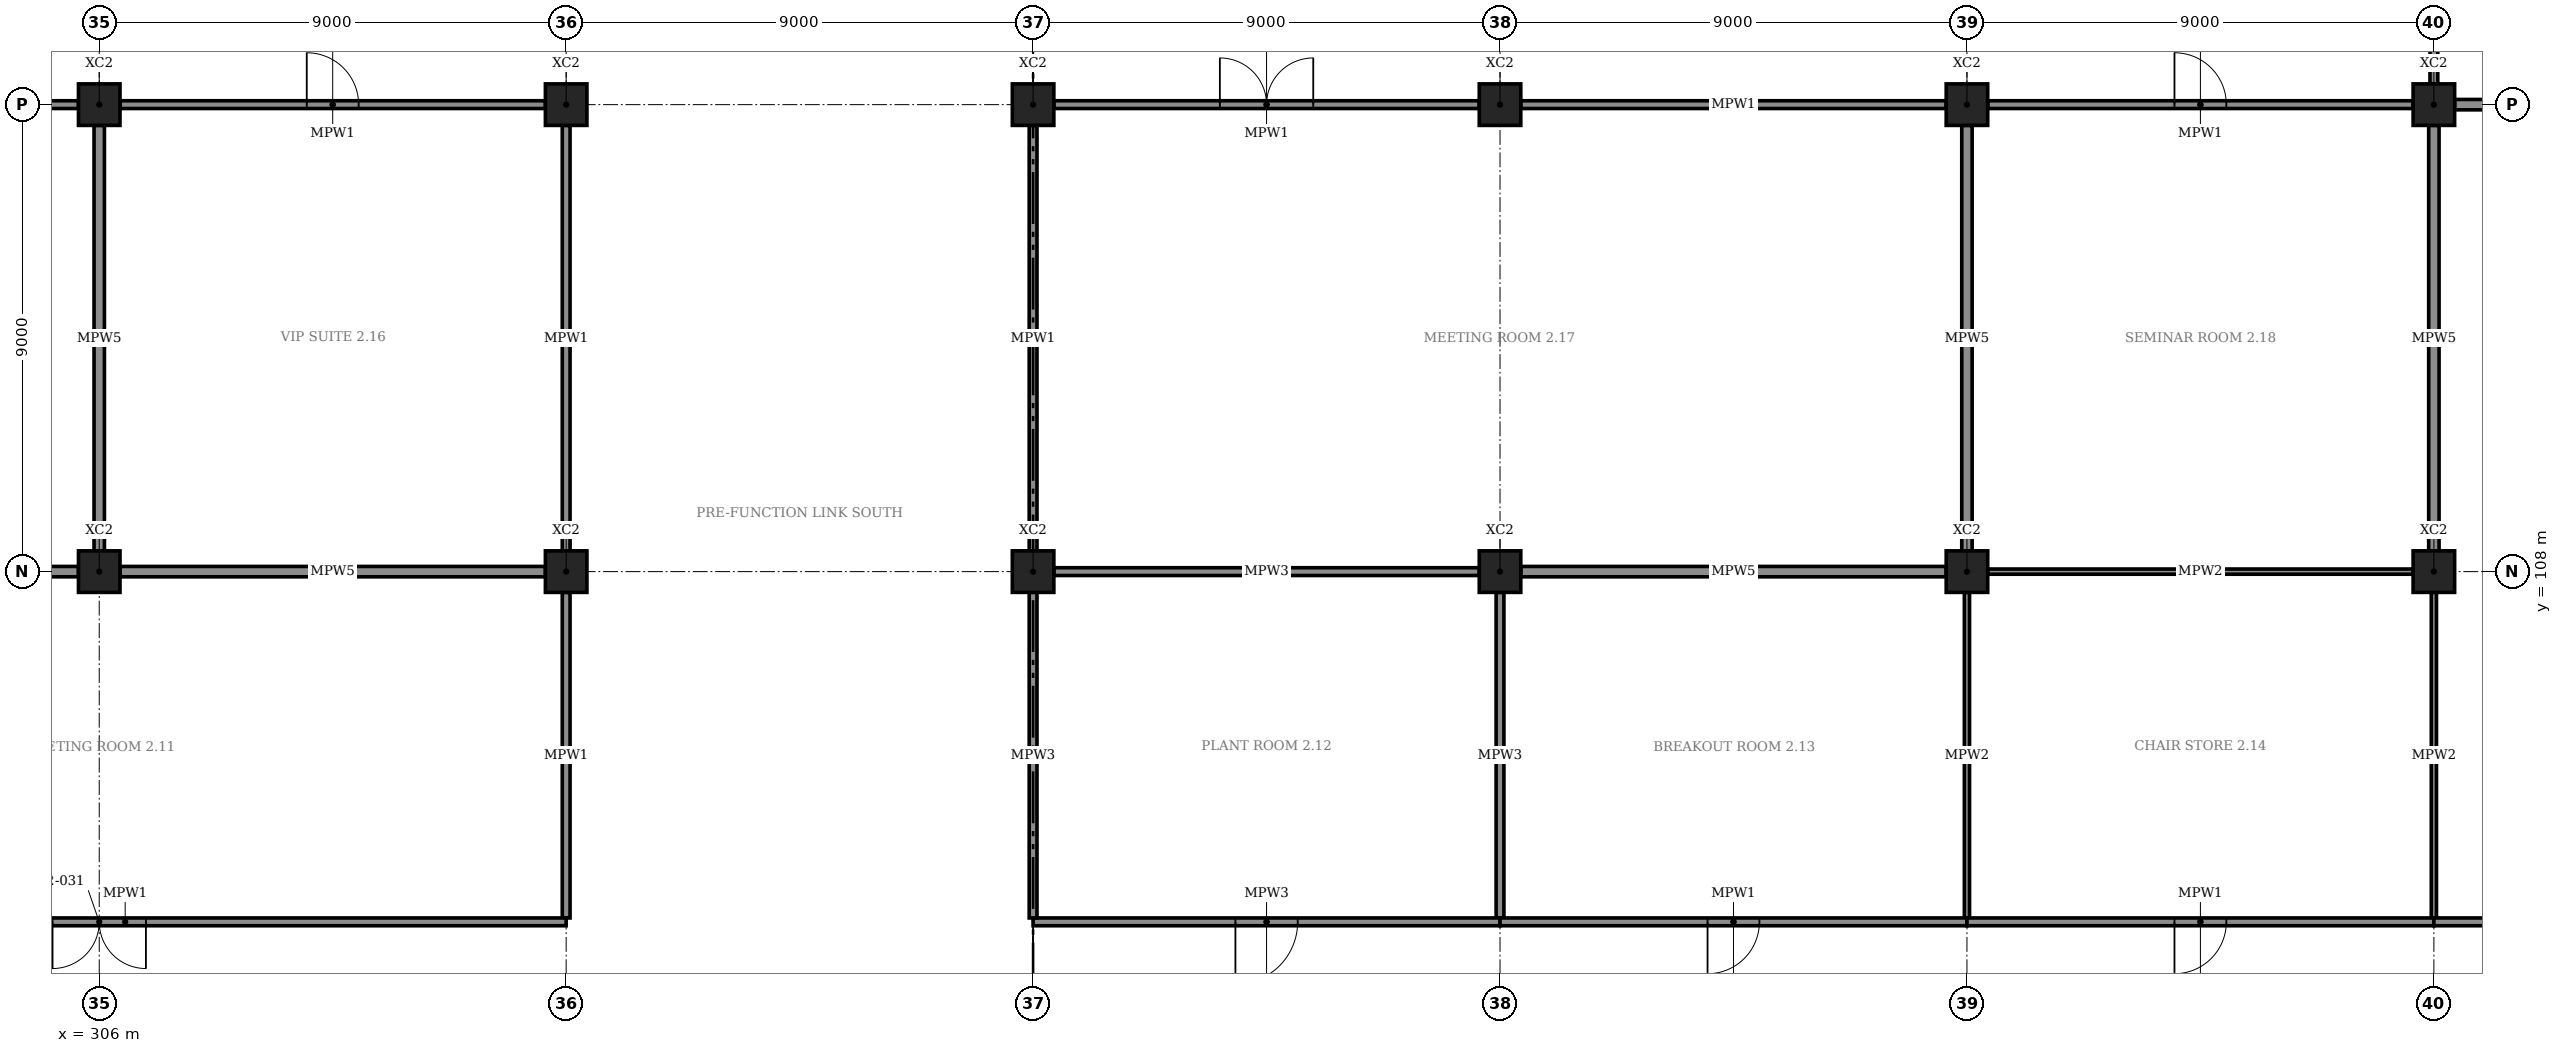
"""IFC4 building model, lengths in metres.
Left out: names, types, materials, properties, quantities, classifications, styles, units other than length and angle.
Written with IfcOpenShell. Run it as: python <this file> out.ifc"""

import sys

from ifc_helpers import new_model, si_unit, direction, frame, frame_2d, origin, origin_2d, place, context, subcontext, project, spatial, rectangle, extrude, element, fill, save


model = new_model("IFC4")
c1 = context("Model", 3, precision=1e-05, world=origin(), true_north=direction((0.0, 1.0)))
c2 = subcontext(c1, "Body", "Model", "MODEL_VIEW")
j1 = project(units=[si_unit("LENGTHUNIT", "METRE"), si_unit("PLANEANGLEUNIT", "RADIAN")], contexts=[c1])
p1 = place(None, origin())
s1 = spatial("IfcSite", under=j1, at=p1, CompositionType="ELEMENT")
p2 = place(p1, origin())
s2 = spatial("IfcBuilding", under=s1, at=p2, CompositionType="ELEMENT")
p3 = place(p2, frame((0.0, 0.0, 11.5)))
s3 = spatial("IfcBuildingStorey", under=s2, at=p3, CompositionType="ELEMENT", Elevation=11.5)
for number, where, z_axis, x_axis in (
    (1, (306.0, 108.0, 0.0), (0.0, 0.0, 1.0), (1.0, 0.0, 0.0)),
    (2, (306.0, 117.0, 0.0), (0.0, 0.0, 1.0), (1.0, 0.0, 0.0)),
    (3, (315.0, 108.0, 0.0), (0.0, 0.0, 1.0), (1.0, 0.0, 0.0)),
    (4, (315.0, 117.0, 0.0), (0.0, 0.0, 1.0), (1.0, 0.0, 0.0)),
    (5, (324.0, 108.0, 0.0), (0.0, 0.0, 1.0), (1.0, 0.0, 0.0)),
    (6, (324.0, 117.0, 0.0), (0.0, 0.0, 1.0), (1.0, 0.0, 0.0)),
    (7, (333.0, 108.0, 0.0), (0.0, 0.0, 1.0), (1.0, 0.0, 0.0)),
    (8, (333.0, 117.0, 0.0), (0.0, 0.0, 1.0), (1.0, 0.0, 0.0)),
    (9, (342.0, 108.0, 0.0), (0.0, 0.0, 1.0), (1.0, 0.0, 0.0)),
    (10, (342.0, 117.0, 0.0), (0.0, 0.0, 1.0), (1.0, 0.0, 0.0)),
    (11, (351.0, 108.0, 0.0), (0.0, 0.0, 1.0), (1.0, 0.0, 0.0)),
    (12, (351.0, 117.0, 0.0), (0.0, 0.0, 1.0), (1.0, 0.0, 0.0)),
):
    element("IfcColumn", number, at=place(p3, frame(where, z_axis=z_axis, x_axis=x_axis)), inside=s3, PredefinedType="COLUMN", context=c2, shape_type="SweptSolid", body=[
        extrude(rectangle(XDim=0.8, YDim=0.8, at=origin_2d()), origin(), (0.0, 0.0, 1.0), 5.5),
    ])
p4 = place(p3, frame((297.0, 101.25, 0.0), z_axis=(0.0, 0.0, 1.0), x_axis=(1.0, 0.0, 0.0)))
e13 = element("IfcWall", 13, at=p4, inside=s3, PredefinedType="PARTITIONING", context=c2, shape_type="SweptSolid", body=[
    extrude(rectangle(XDim=18.0, YDim=0.15, at=frame_2d((9.0, 0.0))), origin(), (0.0, 0.0, 1.0), 4.32),
])
p5 = place(p4, frame((8.1, 0.0, 0.0)))
e14 = element("IfcOpeningElement", 14, at=p5, cuts=e13, PredefinedType="OPENING", context=c2, shape_type="SweptSolid", body=[
    extrude(rectangle(XDim=1.8, YDim=2.4, at=frame_2d((0.9, 1.2))), frame((0.0, 0.085, 0.0), z_axis=(0.0, -1.0, 0.0), x_axis=(1.0, 0.0, 0.0)), (0.0, 0.0, 1.0), 0.17),
])
for number, where, z_axis, x_axis in (
    (15, (297.4, 108.0, 0.0), (0.0, 0.0, 1.0), (1.0, 0.0, 0.0)),
    (16, (306.4, 108.0, 0.0), (0.0, 0.0, 1.0), (1.0, 0.0, 0.0)),
):
    element("IfcWall", number, at=place(p3, frame(where, z_axis=z_axis, x_axis=x_axis)), inside=s3, PredefinedType="PARTITIONING", context=c2, shape_type="SweptSolid", body=[
        extrude(rectangle(XDim=8.2, YDim=0.2, at=frame_2d((4.1, 0.0))), origin(), (0.0, 0.0, 1.0), 4.32),
    ])
p6 = place(p3, frame((315.0, 101.325, 0.0), z_axis=(0.0, 0.0, 1.0), x_axis=(0.0, 1.0, 0.0)))
e17 = element("IfcWall", 17, at=p6, inside=s3, PredefinedType="PARTITIONING", context=c2, shape_type="SweptSolid", body=[
    extrude(rectangle(XDim=6.275, YDim=0.15, at=frame_2d((3.138, 0.0))), origin(), (0.0, 0.0, 1.0), 4.32),
])
p7 = place(p3, frame((324.0, 101.25, 0.0), z_axis=(0.0, 0.0, 1.0), x_axis=(1.0, 0.0, 0.0)))
e18 = element("IfcWall", 18, at=p7, inside=s3, PredefinedType="PARTITIONING", context=c2, shape_type="SweptSolid", body=[
    extrude(rectangle(XDim=9.0, YDim=0.15, at=frame_2d((4.5, 0.0))), origin(), (0.0, 0.0, 1.0), 4.32),
])
p8 = place(p7, frame((3.9, 0.0, 0.0)))
e19 = element("IfcOpeningElement", 19, at=p8, cuts=e18, PredefinedType="OPENING", context=c2, shape_type="SweptSolid", body=[
    extrude(rectangle(XDim=1.2, YDim=2.4, at=frame_2d((0.6, 1.2))), frame((0.0, 0.085, 0.0), z_axis=(0.0, -1.0, 0.0), x_axis=(1.0, 0.0, 0.0)), (0.0, 0.0, 1.0), 0.17),
])
p9 = place(p3, frame((324.4, 108.0, 0.0), z_axis=(0.0, 0.0, 1.0), x_axis=(1.0, 0.0, 0.0)))
e20 = element("IfcWall", 20, at=p9, inside=s3, PredefinedType="PARTITIONING", context=c2, shape_type="SweptSolid", body=[
    extrude(rectangle(XDim=8.2, YDim=0.15, at=frame_2d((4.1, 0.0))), origin(), (0.0, 0.0, 1.0), 4.32),
])
for number, where, z_axis, x_axis in (
    (21, (324.0, 101.325, 0.0), (0.0, 0.0, 1.0), (0.0, 1.0, 0.0)),
    (22, (333.0, 101.325, 0.0), (0.0, 0.0, 1.0), (0.0, 1.0, 0.0)),
):
    element("IfcWall", number, at=place(p3, frame(where, z_axis=z_axis, x_axis=x_axis)), inside=s3, PredefinedType="PARTITIONING", context=c2, shape_type="SweptSolid", body=[
        extrude(rectangle(XDim=6.275, YDim=0.15, at=frame_2d((3.138, 0.0))), origin(), (0.0, 0.0, 1.0), 4.32),
    ])
p10 = place(p3, frame((333.0, 101.25, 0.0), z_axis=(0.0, 0.0, 1.0), x_axis=(1.0, 0.0, 0.0)))
e23 = element("IfcWall", 23, at=p10, inside=s3, PredefinedType="PARTITIONING", context=c2, shape_type="SweptSolid", body=[
    extrude(rectangle(XDim=9.0, YDim=0.15, at=frame_2d((4.5, 0.0))), origin(), (0.0, 0.0, 1.0), 4.32),
])
p11 = place(p10, frame((4.0, 0.0, 0.0)))
e24 = element("IfcOpeningElement", 24, at=p11, cuts=e23, PredefinedType="OPENING", context=c2, shape_type="SweptSolid", body=[
    extrude(rectangle(XDim=1.0, YDim=2.4, at=frame_2d((0.5, 1.2))), frame((0.0, 0.085, 0.0), z_axis=(0.0, -1.0, 0.0), x_axis=(1.0, 0.0, 0.0)), (0.0, 0.0, 1.0), 0.17),
])
p12 = place(p3, frame((333.4, 108.0, 0.0), z_axis=(0.0, 0.0, 1.0), x_axis=(1.0, 0.0, 0.0)))
e25 = element("IfcWall", 25, at=p12, inside=s3, PredefinedType="PARTITIONING", context=c2, shape_type="SweptSolid", body=[
    extrude(rectangle(XDim=8.2, YDim=0.2, at=frame_2d((4.1, 0.0))), origin(), (0.0, 0.0, 1.0), 4.32),
])
p13 = place(p3, frame((342.0, 101.325, 0.0), z_axis=(0.0, 0.0, 1.0), x_axis=(0.0, 1.0, 0.0)))
e26 = element("IfcWall", 26, at=p13, inside=s3, PredefinedType="PARTITIONING", context=c2, shape_type="SweptSolid", body=[
    extrude(rectangle(XDim=6.275, YDim=0.1, at=frame_2d((3.138, 0.0))), origin(), (0.0, 0.0, 1.0), 4.32),
])
p14 = place(p3, frame((342.0, 101.25, 0.0), z_axis=(0.0, 0.0, 1.0), x_axis=(1.0, 0.0, 0.0)))
e27 = element("IfcWall", 27, at=p14, inside=s3, PredefinedType="PARTITIONING", context=c2, shape_type="SweptSolid", body=[
    extrude(rectangle(XDim=9.0, YDim=0.15, at=frame_2d((4.5, 0.0))), origin(), (0.0, 0.0, 1.0), 4.32),
])
p15 = place(p14, frame((4.0, 0.0, 0.0)))
e28 = element("IfcOpeningElement", 28, at=p15, cuts=e27, PredefinedType="OPENING", context=c2, shape_type="SweptSolid", body=[
    extrude(rectangle(XDim=1.0, YDim=2.4, at=frame_2d((0.5, 1.2))), frame((0.0, 0.085, 0.0), z_axis=(0.0, -1.0, 0.0), x_axis=(1.0, 0.0, 0.0)), (0.0, 0.0, 1.0), 0.17),
])
p16 = place(p3, frame((342.4, 108.0, 0.0), z_axis=(0.0, 0.0, 1.0), x_axis=(1.0, 0.0, 0.0)))
e29 = element("IfcWall", 29, at=p16, inside=s3, PredefinedType="PARTITIONING", context=c2, shape_type="SweptSolid", body=[
    extrude(rectangle(XDim=8.2, YDim=0.1, at=frame_2d((4.1, 0.0))), origin(), (0.0, 0.0, 1.0), 4.32),
])
p17 = place(p3, frame((351.0, 101.325, 0.0), z_axis=(0.0, 0.0, 1.0), x_axis=(0.0, 1.0, 0.0)))
e30 = element("IfcWall", 30, at=p17, inside=s3, PredefinedType="PARTITIONING", context=c2, shape_type="SweptSolid", body=[
    extrude(rectangle(XDim=6.275, YDim=0.1, at=frame_2d((3.138, 0.0))), origin(), (0.0, 0.0, 1.0), 4.32),
])
p18 = place(p3, frame((297.4, 117.0, 0.0), z_axis=(0.0, 0.0, 1.0), x_axis=(1.0, 0.0, 0.0)))
e31 = element("IfcWall", 31, at=p18, inside=s3, PredefinedType="PARTITIONING", context=c2, shape_type="SweptSolid", body=[
    extrude(rectangle(XDim=8.2, YDim=0.15, at=frame_2d((4.1, 0.0))), origin(), (0.0, 0.0, 1.0), 4.32),
])
p19 = place(p18, frame((3.6, 0.0, 0.0)))
e32 = element("IfcOpeningElement", 32, at=p19, cuts=e31, PredefinedType="OPENING", context=c2, shape_type="SweptSolid", body=[
    extrude(rectangle(XDim=1.0, YDim=2.4, at=frame_2d((0.5, 1.2))), frame((0.0, 0.085, 0.0), z_axis=(0.0, -1.0, 0.0), x_axis=(1.0, 0.0, 0.0)), (0.0, 0.0, 1.0), 0.17),
])
p20 = place(p3, frame((306.0, 108.4, 0.0), z_axis=(0.0, 0.0, 1.0), x_axis=(0.0, 1.0, 0.0)))
e33 = element("IfcWall", 33, at=p20, inside=s3, PredefinedType="PARTITIONING", context=c2, shape_type="SweptSolid", body=[
    extrude(rectangle(XDim=8.2, YDim=0.2, at=frame_2d((4.1, 0.0))), origin(), (0.0, 0.0, 1.0), 4.32),
])
p21 = place(p3, frame((306.4, 117.0, 0.0), z_axis=(0.0, 0.0, 1.0), x_axis=(1.0, 0.0, 0.0)))
e34 = element("IfcWall", 34, at=p21, inside=s3, PredefinedType="PARTITIONING", context=c2, shape_type="SweptSolid", body=[
    extrude(rectangle(XDim=8.2, YDim=0.15, at=frame_2d((4.1, 0.0))), origin(), (0.0, 0.0, 1.0), 4.32),
])
p22 = place(p21, frame((3.6, 0.0, 0.0)))
e35 = element("IfcOpeningElement", 35, at=p22, cuts=e34, PredefinedType="OPENING", context=c2, shape_type="SweptSolid", body=[
    extrude(rectangle(XDim=1.0, YDim=2.4, at=frame_2d((0.5, 1.2))), frame((0.0, 0.085, 0.0), z_axis=(0.0, -1.0, 0.0), x_axis=(1.0, 0.0, 0.0)), (0.0, 0.0, 1.0), 0.17),
])
p23 = place(p3, frame((315.0, 108.4, 0.0), z_axis=(0.0, 0.0, 1.0), x_axis=(0.0, 1.0, 0.0)))
e36 = element("IfcWall", 36, at=p23, inside=s3, PredefinedType="PARTITIONING", context=c2, shape_type="SweptSolid", body=[
    extrude(rectangle(XDim=8.2, YDim=0.15, at=frame_2d((4.1, 0.0))), origin(), (0.0, 0.0, 1.0), 4.32),
])
p24 = place(p3, frame((324.4, 117.0, 0.0), z_axis=(0.0, 0.0, 1.0), x_axis=(1.0, 0.0, 0.0)))
e37 = element("IfcWall", 37, at=p24, inside=s3, PredefinedType="PARTITIONING", context=c2, shape_type="SweptSolid", body=[
    extrude(rectangle(XDim=8.2, YDim=0.15, at=frame_2d((4.1, 0.0))), origin(), (0.0, 0.0, 1.0), 4.32),
])
p25 = place(p24, frame((3.2, 0.0, 0.0)))
e38 = element("IfcOpeningElement", 38, at=p25, cuts=e37, PredefinedType="OPENING", context=c2, shape_type="SweptSolid", body=[
    extrude(rectangle(XDim=1.8, YDim=2.4, at=frame_2d((0.9, 1.2))), frame((0.0, 0.085, 0.0), z_axis=(0.0, -1.0, 0.0), x_axis=(1.0, 0.0, 0.0)), (0.0, 0.0, 1.0), 0.17),
])
for number, where, z_axis, x_axis in (
    (39, (333.4, 117.0, 0.0), (0.0, 0.0, 1.0), (1.0, 0.0, 0.0)),
    (40, (324.0, 108.4, 0.0), (0.0, 0.0, 1.0), (0.0, 1.0, 0.0)),
):
    element("IfcWall", number, at=place(p3, frame(where, z_axis=z_axis, x_axis=x_axis)), inside=s3, PredefinedType="PARTITIONING", context=c2, shape_type="SweptSolid", body=[
        extrude(rectangle(XDim=8.2, YDim=0.15, at=frame_2d((4.1, 0.0))), origin(), (0.0, 0.0, 1.0), 4.32),
    ])
p26 = place(p3, frame((342.0, 108.4, 0.0), z_axis=(0.0, 0.0, 1.0), x_axis=(0.0, 1.0, 0.0)))
e41 = element("IfcWall", 41, at=p26, inside=s3, PredefinedType="PARTITIONING", context=c2, shape_type="SweptSolid", body=[
    extrude(rectangle(XDim=8.2, YDim=0.2, at=frame_2d((4.1, 0.0))), origin(), (0.0, 0.0, 1.0), 4.32),
])
p27 = place(p3, frame((342.4, 117.0, 0.0), z_axis=(0.0, 0.0, 1.0), x_axis=(1.0, 0.0, 0.0)))
e42 = element("IfcWall", 42, at=p27, inside=s3, PredefinedType="PARTITIONING", context=c2, shape_type="SweptSolid", body=[
    extrude(rectangle(XDim=8.2, YDim=0.15, at=frame_2d((4.1, 0.0))), origin(), (0.0, 0.0, 1.0), 4.32),
])
p28 = place(p27, frame((3.6, 0.0, 0.0)))
e43 = element("IfcOpeningElement", 43, at=p28, cuts=e42, PredefinedType="OPENING", context=c2, shape_type="SweptSolid", body=[
    extrude(rectangle(XDim=1.0, YDim=2.4, at=frame_2d((0.5, 1.2))), frame((0.0, 0.085, 0.0), z_axis=(0.0, -1.0, 0.0), x_axis=(1.0, 0.0, 0.0)), (0.0, 0.0, 1.0), 0.17),
])
for number, where, z_axis, x_axis in (
    (44, (351.0, 108.4, 0.0), (0.0, 0.0, 1.0), (0.0, 1.0, 0.0)),
    (45, (351.4, 117.0, 0.0), (0.0, 0.0, 1.0), (1.0, 0.0, 0.0)),
):
    element("IfcWall", number, at=place(p3, frame(where, z_axis=z_axis, x_axis=x_axis)), inside=s3, PredefinedType="PARTITIONING", context=c2, shape_type="SweptSolid", body=[
        extrude(rectangle(XDim=8.2, YDim=0.2, at=frame_2d((4.1, 0.0))), origin(), (0.0, 0.0, 1.0), 4.32),
    ])
p29 = place(p3, frame((351.0, 117.4, 0.0), z_axis=(0.0, 0.0, 1.0), x_axis=(0.0, 1.0, 0.0)))
e46 = element("IfcWall", 46, at=p29, inside=s3, PredefinedType="PARTITIONING", context=c2, shape_type="SweptSolid", body=[
    extrude(rectangle(XDim=8.2, YDim=0.15, at=frame_2d((4.1, 0.0))), origin(), (0.0, 0.0, 1.0), 4.32),
])
p30 = place(p29, frame((3.6, 0.0, 0.0)))
e47 = element("IfcOpeningElement", 47, at=p30, cuts=e46, PredefinedType="OPENING", context=c2, shape_type="SweptSolid", body=[
    extrude(rectangle(XDim=1.0, YDim=2.4, at=frame_2d((0.5, 1.2))), frame((0.0, 0.085, 0.0), z_axis=(0.0, -1.0, 0.0), x_axis=(1.0, 0.0, 0.0)), (0.0, 0.0, 1.0), 0.17),
])
p31 = place(p3, frame((351.0, 101.25, 0.0), z_axis=(0.0, 0.0, 1.0), x_axis=(1.0, 0.0, 0.0)))
e48 = element("IfcWall", 48, at=p31, inside=s3, PredefinedType="PARTITIONING", context=c2, shape_type="SweptSolid", body=[
    extrude(rectangle(XDim=8.8, YDim=0.15, at=frame_2d((4.4, 0.0))), origin(), (0.0, 0.0, 1.0), 4.32),
])
p32 = place(p31, frame((3.5, 0.0, 0.0)))
e49 = element("IfcOpeningElement", 49, at=p32, cuts=e48, PredefinedType="OPENING", context=c2, shape_type="SweptSolid", body=[
    extrude(rectangle(XDim=1.8, YDim=2.4, at=frame_2d((0.9, 1.2))), frame((0.0, 0.085, 0.0), z_axis=(0.0, -1.0, 0.0), x_axis=(1.0, 0.0, 0.0)), (0.0, 0.0, 1.0), 0.17),
])
p33 = place(p5, frame((1.8, 0.0, 0.0), z_axis=(0.0, 0.0, 1.0), x_axis=(-1.0, 0.0, 0.0)))
e50 = element("IfcDoor", 50, at=p33, inside=s3, OperationType="DOUBLE_DOOR_SINGLE_SWING", PredefinedType="DOOR", context=c2, shape_type="SweptSolid", body=[
    extrude(rectangle(XDim=1.8, YDim=2.4, at=frame_2d((0.9, 1.2))), frame((0.0, 0.025, 0.0), z_axis=(0.0, -1.0, 0.0), x_axis=(1.0, 0.0, 0.0)), (0.0, 0.0, 1.0), 0.05),
])
fill(e14, e50)
p34 = place(p8, frame((1.2, 0.0, 0.0), z_axis=(0.0, 0.0, 1.0), x_axis=(-1.0, 0.0, 0.0)))
e51 = element("IfcDoor", 51, at=p34, inside=s3, OperationType="SINGLE_SWING_LEFT", PredefinedType="DOOR", context=c2, shape_type="SweptSolid", body=[
    extrude(rectangle(XDim=1.2, YDim=2.4, at=frame_2d((0.6, 1.2))), frame((0.0, 0.025, 0.0), z_axis=(0.0, -1.0, 0.0), x_axis=(1.0, 0.0, 0.0)), (0.0, 0.0, 1.0), 0.05),
])
fill(e19, e51)
p35 = place(p11, frame((1.0, 0.0, 0.0), z_axis=(0.0, 0.0, 1.0), x_axis=(-1.0, 0.0, 0.0)))
e52 = element("IfcDoor", 52, at=p35, inside=s3, OperationType="SINGLE_SWING_LEFT", PredefinedType="DOOR", context=c2, shape_type="SweptSolid", body=[
    extrude(rectangle(XDim=1.0, YDim=2.4, at=frame_2d((0.5, 1.2))), frame((0.0, 0.025, 0.0), z_axis=(0.0, -1.0, 0.0), x_axis=(1.0, 0.0, 0.0)), (0.0, 0.0, 1.0), 0.05),
])
fill(e24, e52)
p36 = place(p15, frame((1.0, 0.0, 0.0), z_axis=(0.0, 0.0, 1.0), x_axis=(-1.0, 0.0, 0.0)))
e53 = element("IfcDoor", 53, at=p36, inside=s3, OperationType="SINGLE_SWING_LEFT", PredefinedType="DOOR", context=c2, shape_type="SweptSolid", body=[
    extrude(rectangle(XDim=1.0, YDim=2.4, at=frame_2d((0.5, 1.2))), frame((0.0, 0.025, 0.0), z_axis=(0.0, -1.0, 0.0), x_axis=(1.0, 0.0, 0.0)), (0.0, 0.0, 1.0), 0.05),
])
fill(e28, e53)
p37 = place(p22, origin())
e54 = element("IfcDoor", 54, at=p37, inside=s3, OperationType="SINGLE_SWING_LEFT", PredefinedType="DOOR", context=c2, shape_type="SweptSolid", body=[
    extrude(rectangle(XDim=1.0, YDim=2.4, at=frame_2d((0.5, 1.2))), frame((0.0, 0.025, 0.0), z_axis=(0.0, -1.0, 0.0), x_axis=(1.0, 0.0, 0.0)), (0.0, 0.0, 1.0), 0.05),
])
fill(e35, e54)
p38 = place(p25, origin())
e55 = element("IfcDoor", 55, at=p38, inside=s3, OperationType="DOUBLE_DOOR_SINGLE_SWING", PredefinedType="DOOR", context=c2, shape_type="SweptSolid", body=[
    extrude(rectangle(XDim=1.8, YDim=2.4, at=frame_2d((0.9, 1.2))), frame((0.0, 0.025, 0.0), z_axis=(0.0, -1.0, 0.0), x_axis=(1.0, 0.0, 0.0)), (0.0, 0.0, 1.0), 0.05),
])
fill(e38, e55)
p39 = place(p28, origin())
e56 = element("IfcDoor", 56, at=p39, inside=s3, OperationType="SINGLE_SWING_LEFT", PredefinedType="DOOR", context=c2, shape_type="SweptSolid", body=[
    extrude(rectangle(XDim=1.0, YDim=2.4, at=frame_2d((0.5, 1.2))), frame((0.0, 0.025, 0.0), z_axis=(0.0, -1.0, 0.0), x_axis=(1.0, 0.0, 0.0)), (0.0, 0.0, 1.0), 0.05),
])
fill(e43, e56)
save(model, sys.argv[1])
